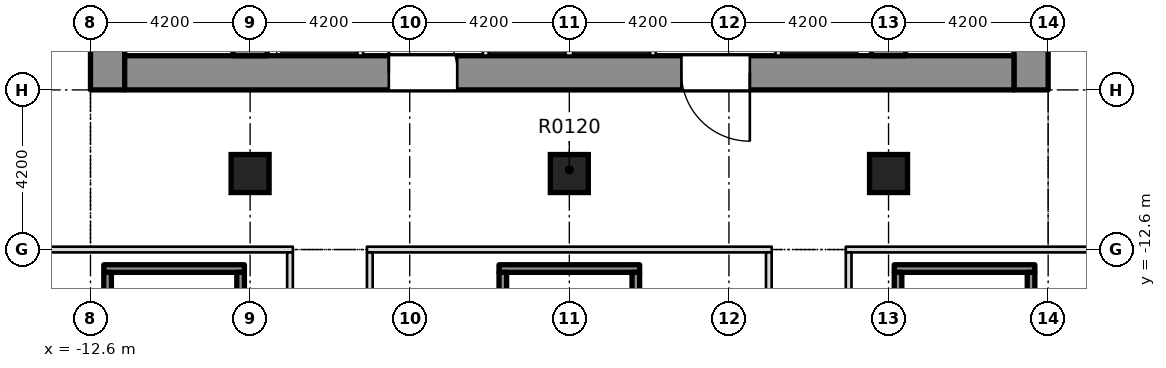
"""IFC4 building model, lengths in metres.
Left out: names, types, materials, properties, quantities, classifications, styles, units other than length and angle.
Written with IfcOpenShell. Run it as: python <this file> out.ifc"""

import sys

from ifc_helpers import new_model, si_unit, direction, frame, frame_2d, origin, origin_2d, place, context, subcontext, project, spatial, rectangle, extrude, element, fill, save


model = new_model("IFC4")
c1 = context("Model", 3, precision=1e-05, world=origin(), true_north=direction((0.0, 1.0)))
c2 = subcontext(c1, "Body", "Model", "MODEL_VIEW")
j1 = project(units=[si_unit("LENGTHUNIT", "METRE"), si_unit("PLANEANGLEUNIT", "RADIAN")], contexts=[c1])
p1 = place(None, origin())
s1 = spatial("IfcSite", under=j1, at=p1, CompositionType="ELEMENT")
p2 = place(p1, origin())
s2 = spatial("IfcBuilding", under=s1, at=p2, CompositionType="ELEMENT")
p3 = place(p2, frame((0.0, 0.0, 7.5)))
s3 = spatial("IfcBuildingStorey", under=s2, at=p3, CompositionType="ELEMENT", Elevation=7.5)
p4 = place(p3, frame((12.15, -8.4, -0.4), z_axis=(0.0, 0.0, 1.0), x_axis=(0.0, 1.0, 0.0)))
e1 = element("IfcWall", 1, at=p4, inside=s3, PredefinedType="SHEAR", context=c2, shape_type="SweptSolid", body=[
    extrude(rectangle(XDim=30.15, YDim=0.9, at=frame_2d((15.075, 0.0))), origin(), (0.0, 0.0, 1.0), 5.0),
])
p5 = place(p4, frame((2.925, 0.0, 0.4)))
e2 = element("IfcOpeningElement", 2, at=p5, cuts=e1, PredefinedType="OPENING", context=c2, shape_type="SweptSolid", body=[
    extrude(rectangle(XDim=0.95, YDim=2.1, at=frame_2d((0.475, 1.05))), frame((0.0, 0.46, 0.0), z_axis=(0.0, -1.0, 0.0), x_axis=(1.0, 0.0, 0.0)), (0.0, 0.0, 1.0), 0.92),
])
p6 = place(p4, frame((7.025, 0.0, 0.4)))
e3 = element("IfcOpeningElement", 3, at=p6, cuts=e1, PredefinedType="OPENING", context=c2, shape_type="SweptSolid", body=[
    extrude(rectangle(XDim=0.95, YDim=2.1, at=frame_2d((0.475, 1.05))), frame((0.0, 0.46, 0.0), z_axis=(0.0, -1.0, 0.0), x_axis=(1.0, 0.0, 0.0)), (0.0, 0.0, 1.0), 0.92),
])
p7 = place(p4, frame((10.875, 0.0, 0.4)))
e4 = element("IfcOpeningElement", 4, at=p7, cuts=e1, PredefinedType="OPENING", context=c2, shape_type="SweptSolid", body=[
    extrude(rectangle(XDim=0.95, YDim=2.1, at=frame_2d((0.475, 1.05))), frame((0.0, 0.46, 0.0), z_axis=(0.0, -1.0, 0.0), x_axis=(1.0, 0.0, 0.0)), (0.0, 0.0, 1.0), 0.92),
])
p8 = place(p4, frame((15.625, 0.0, 0.4)))
e5 = element("IfcOpeningElement", 5, at=p8, cuts=e1, PredefinedType="OPENING", context=c2, shape_type="SweptSolid", body=[
    extrude(rectangle(XDim=0.95, YDim=2.1, at=frame_2d((0.475, 1.05))), frame((0.0, 0.46, 0.0), z_axis=(0.0, -1.0, 0.0), x_axis=(1.0, 0.0, 0.0)), (0.0, 0.0, 1.0), 0.92),
])
p9 = place(p4, frame((24.75, 0.0, 0.4)))
e6 = element("IfcOpeningElement", 6, at=p9, cuts=e1, PredefinedType="OPENING", context=c2, shape_type="SweptSolid", body=[
    extrude(rectangle(XDim=0.95, YDim=2.1, at=frame_2d((0.475, 1.05))), frame((0.0, 0.46, 0.0), z_axis=(0.0, -1.0, 0.0), x_axis=(1.0, 0.0, 0.0)), (0.0, 0.0, 1.0), 0.92),
])
p10 = place(p4, frame((19.3, 0.0, 0.4)))
e7 = element("IfcOpeningElement", 7, at=p10, cuts=e1, PredefinedType="OPENING", context=c2, shape_type="SweptSolid", body=[
    extrude(rectangle(XDim=1.2, YDim=2.1, at=frame_2d((0.6, 1.05))), frame((0.0, 0.46, 0.0), z_axis=(0.0, -1.0, 0.0), x_axis=(1.0, 0.0, 0.0)), (0.0, 0.0, 1.0), 0.92),
])
p11 = place(p3, frame((-12.15, -8.4, -0.4), z_axis=(0.0, 0.0, 1.0), x_axis=(0.0, 1.0, 0.0)))
e8 = element("IfcWall", 8, at=p11, inside=s3, PredefinedType="SHEAR", context=c2, shape_type="SweptSolid", body=[
    extrude(rectangle(XDim=30.15, YDim=0.9, at=frame_2d((15.075, 0.0))), origin(), (0.0, 0.0, 1.0), 5.0),
])
p12 = place(p11, frame((2.875, 0.0, 0.4)))
e9 = element("IfcOpeningElement", 9, at=p12, cuts=e8, PredefinedType="OPENING", context=c2, shape_type="SweptSolid", body=[
    extrude(rectangle(XDim=0.95, YDim=2.1, at=frame_2d((0.475, 1.05))), frame((0.0, 0.46, 0.0), z_axis=(0.0, -1.0, 0.0), x_axis=(1.0, 0.0, 0.0)), (0.0, 0.0, 1.0), 0.92),
])
p13 = place(p11, frame((6.575, 0.0, 0.4)))
e10 = element("IfcOpeningElement", 10, at=p13, cuts=e8, PredefinedType="OPENING", context=c2, shape_type="SweptSolid", body=[
    extrude(rectangle(XDim=0.95, YDim=2.1, at=frame_2d((0.475, 1.05))), frame((0.0, 0.46, 0.0), z_axis=(0.0, -1.0, 0.0), x_axis=(1.0, 0.0, 0.0)), (0.0, 0.0, 1.0), 0.92),
])
p14 = place(p11, frame((9.425, 0.0, 0.4)))
e11 = element("IfcOpeningElement", 11, at=p14, cuts=e8, PredefinedType="OPENING", context=c2, shape_type="SweptSolid", body=[
    extrude(rectangle(XDim=0.95, YDim=2.1, at=frame_2d((0.475, 1.05))), frame((0.0, 0.46, 0.0), z_axis=(0.0, -1.0, 0.0), x_axis=(1.0, 0.0, 0.0)), (0.0, 0.0, 1.0), 0.92),
])
p15 = place(p11, frame((13.225, 0.0, 0.4)))
e12 = element("IfcOpeningElement", 12, at=p15, cuts=e8, PredefinedType="OPENING", context=c2, shape_type="SweptSolid", body=[
    extrude(rectangle(XDim=0.95, YDim=2.1, at=frame_2d((0.475, 1.05))), frame((0.0, 0.46, 0.0), z_axis=(0.0, -1.0, 0.0), x_axis=(1.0, 0.0, 0.0)), (0.0, 0.0, 1.0), 0.92),
])
p16 = place(p11, frame((16.775, 0.0, 0.4)))
e13 = element("IfcOpeningElement", 13, at=p16, cuts=e8, PredefinedType="OPENING", context=c2, shape_type="SweptSolid", body=[
    extrude(rectangle(XDim=0.95, YDim=2.1, at=frame_2d((0.475, 1.05))), frame((0.0, 0.46, 0.0), z_axis=(0.0, -1.0, 0.0), x_axis=(1.0, 0.0, 0.0)), (0.0, 0.0, 1.0), 0.92),
])
p17 = place(p11, frame((24.75, 0.0, 0.4)))
e14 = element("IfcOpeningElement", 14, at=p17, cuts=e8, PredefinedType="OPENING", context=c2, shape_type="SweptSolid", body=[
    extrude(rectangle(XDim=0.95, YDim=2.1, at=frame_2d((0.475, 1.05))), frame((0.0, 0.46, 0.0), z_axis=(0.0, -1.0, 0.0), x_axis=(1.0, 0.0, 0.0)), (0.0, 0.0, 1.0), 0.92),
])
p18 = place(p11, frame((19.3, 0.0, 0.4)))
e15 = element("IfcOpeningElement", 15, at=p18, cuts=e8, PredefinedType="OPENING", context=c2, shape_type="SweptSolid", body=[
    extrude(rectangle(XDim=1.2, YDim=2.1, at=frame_2d((0.6, 1.05))), frame((0.0, 0.46, 0.0), z_axis=(0.0, -1.0, 0.0), x_axis=(1.0, 0.0, 0.0)), (0.0, 0.0, 1.0), 0.92),
])
p19 = place(p3, frame((-11.7, -7.95, -0.4), z_axis=(0.0, 0.0, 1.0), x_axis=(1.0, 0.0, 0.0)))
e16 = element("IfcWall", 16, at=p19, inside=s3, PredefinedType="SHEAR", context=c2, shape_type="SweptSolid", body=[
    extrude(rectangle(XDim=23.4, YDim=0.9, at=frame_2d((11.7, 0.0))), origin(), (0.0, 0.0, 1.0), 5.0),
])
p20 = place(p19, frame((6.95, 0.0, 0.4)))
e17 = element("IfcOpeningElement", 17, at=p20, cuts=e16, PredefinedType="OPENING", context=c2, shape_type="SweptSolid", body=[
    extrude(rectangle(XDim=1.8, YDim=2.1, at=frame_2d((0.9, 1.05))), frame((0.0, 0.46, 0.0), z_axis=(0.0, -1.0, 0.0), x_axis=(1.0, 0.0, 0.0)), (0.0, 0.0, 1.0), 0.92),
])
p21 = place(p19, frame((14.65, 0.0, 0.4)))
e18 = element("IfcOpeningElement", 18, at=p21, cuts=e16, PredefinedType="OPENING", context=c2, shape_type="SweptSolid", body=[
    extrude(rectangle(XDim=1.8, YDim=2.1, at=frame_2d((0.9, 1.05))), frame((0.0, 0.46, 0.0), z_axis=(0.0, -1.0, 0.0), x_axis=(1.0, 0.0, 0.0)), (0.0, 0.0, 1.0), 0.92),
])
p22 = place(p3, frame((-8.4, -7.5, -0.4), z_axis=(0.0, 0.0, 1.0), x_axis=(0.0, 1.0, 0.0)))
e19 = element("IfcWall", 19, at=p22, inside=s3, PredefinedType="SHEAR", context=c2, shape_type="SweptSolid", body=[
    extrude(rectangle(XDim=28.35, YDim=0.9, at=frame_2d((14.175, 0.0))), origin(), (0.0, 0.0, 1.0), 5.0),
])
p23 = place(p22, frame((18.4, 0.0, 0.4)))
e20 = element("IfcOpeningElement", 20, at=p23, cuts=e19, PredefinedType="OPENING", context=c2, shape_type="SweptSolid", body=[
    extrude(rectangle(XDim=1.2, YDim=2.1, at=frame_2d((0.6, 1.05))), frame((0.0, 0.46, 0.0), z_axis=(0.0, -1.0, 0.0), x_axis=(1.0, 0.0, 0.0)), (0.0, 0.0, 1.0), 0.92),
])
p24 = place(p3, frame((8.4, -7.5, -0.4), z_axis=(0.0, 0.0, 1.0), x_axis=(0.0, 1.0, 0.0)))
e21 = element("IfcWall", 21, at=p24, inside=s3, PredefinedType="SHEAR", context=c2, shape_type="SweptSolid", body=[
    extrude(rectangle(XDim=28.35, YDim=0.9, at=frame_2d((14.175, 0.0))), origin(), (0.0, 0.0, 1.0), 5.0),
])
p25 = place(p24, frame((18.4, 0.0, 0.4)))
e22 = element("IfcOpeningElement", 22, at=p25, cuts=e21, PredefinedType="OPENING", context=c2, shape_type="SweptSolid", body=[
    extrude(rectangle(XDim=1.2, YDim=2.1, at=frame_2d((0.6, 1.05))), frame((0.0, 0.46, 0.0), z_axis=(0.0, -1.0, 0.0), x_axis=(1.0, 0.0, 0.0)), (0.0, 0.0, 1.0), 0.92),
])
for number, where, z_axis, x_axis in (
    (23, (-8.4, -10.6, -0.4), (0.0, 0.0, 1.0), (1.0, 0.0, 0.0)),
    (24, (0.0, -10.6, -0.4), (0.0, 0.0, 1.0), (1.0, 0.0, 0.0)),
    (25, (8.4, -10.6, -0.4), (0.0, 0.0, 1.0), (1.0, 0.0, 0.0)),
):
    element("IfcColumn", number, at=place(p3, frame(where, z_axis=z_axis, x_axis=x_axis)), inside=s3, PredefinedType="COLUMN", context=c2, shape_type="SweptSolid", body=[
        extrude(rectangle(XDim=1.0, YDim=1.0, at=origin_2d()), origin(), (0.0, 0.0, 1.0), 5.0),
    ])
p26 = place(p3, frame((-16.9, -12.6, 0.0), z_axis=(0.0, 0.0, 1.0), x_axis=(1.0, 0.0, 0.0)))
e26 = element("IfcWall", 26, at=p26, inside=s3, PredefinedType="PARTITIONING", context=c2, shape_type="SweptSolid", body=[
    extrude(rectangle(XDim=9.625, YDim=0.15, at=frame_2d((4.812, 0.0))), origin(), (0.0, 0.0, 1.0), 4.6),
])
p27 = place(p3, frame((-5.325, -12.6, 0.0), z_axis=(0.0, 0.0, 1.0), x_axis=(1.0, 0.0, 0.0)))
e27 = element("IfcWall", 27, at=p27, inside=s3, PredefinedType="PARTITIONING", context=c2, shape_type="SweptSolid", body=[
    extrude(rectangle(XDim=10.65, YDim=0.15, at=frame_2d((5.325, 0.0))), origin(), (0.0, 0.0, 1.0), 4.6),
])
p28 = place(p3, frame((7.275, -12.6, 0.0), z_axis=(0.0, 0.0, 1.0), x_axis=(1.0, 0.0, 0.0)))
e28 = element("IfcWall", 28, at=p28, inside=s3, PredefinedType="PARTITIONING", context=c2, shape_type="SweptSolid", body=[
    extrude(rectangle(XDim=9.625, YDim=0.15, at=frame_2d((4.812, 0.0))), origin(), (0.0, 0.0, 1.0), 4.6),
])
for number, where, z_axis, x_axis in (
    (29, (-7.35, -18.125, 0.0), (0.0, 0.0, 1.0), (0.0, 1.0, 0.0)),
    (30, (-5.25, -18.125, 0.0), (0.0, 0.0, 1.0), (0.0, 1.0, 0.0)),
    (31, (5.25, -18.125, 0.0), (0.0, 0.0, 1.0), (0.0, 1.0, 0.0)),
    (32, (7.35, -18.125, 0.0), (0.0, 0.0, 1.0), (0.0, 1.0, 0.0)),
):
    element("IfcWall", number, at=place(p3, frame(where, z_axis=z_axis, x_axis=x_axis)), inside=s3, PredefinedType="PARTITIONING", context=c2, shape_type="SweptSolid", body=[
        extrude(rectangle(XDim=5.45, YDim=0.15, at=frame_2d((2.725, 0.0))), origin(), (0.0, 0.0, 1.0), 4.6),
    ])
p29 = place(p3, frame((-5.5, -7.499, 0.0), z_axis=(0.0, 0.0, 1.0), x_axis=(0.0, 1.0, 0.0)))
e33 = element("IfcWall", 33, at=p29, inside=s3, PredefinedType="PARTITIONING", context=c2, shape_type="SweptSolid", body=[
    extrude(rectangle(XDim=11.924, YDim=0.15, at=frame_2d((5.962, 0.0))), origin(), (0.0, 0.0, 1.0), 4.6),
])
p30 = place(p29, frame((0.949, 0.0, 0.0)))
e34 = element("IfcOpeningElement", 34, at=p30, cuts=e33, PredefinedType="OPENING", context=c2, shape_type="SweptSolid", body=[
    extrude(rectangle(XDim=1.1, YDim=2.1, at=frame_2d((0.55, 1.05))), frame((0.0, 0.085, 0.0), z_axis=(0.0, -1.0, 0.0), x_axis=(1.0, 0.0, 0.0)), (0.0, 0.0, 1.0), 0.17),
])
p31 = place(p29, frame((3.949, 0.0, 0.0)))
e35 = element("IfcOpeningElement", 35, at=p31, cuts=e33, PredefinedType="OPENING", context=c2, shape_type="SweptSolid", body=[
    extrude(rectangle(XDim=1.1, YDim=2.1, at=frame_2d((0.55, 1.05))), frame((0.0, 0.085, 0.0), z_axis=(0.0, -1.0, 0.0), x_axis=(1.0, 0.0, 0.0)), (0.0, 0.0, 1.0), 0.17),
])
p32 = place(p29, frame((6.949, 0.0, 0.0)))
e36 = element("IfcOpeningElement", 36, at=p32, cuts=e33, PredefinedType="OPENING", context=c2, shape_type="SweptSolid", body=[
    extrude(rectangle(XDim=1.1, YDim=2.1, at=frame_2d((0.55, 1.05))), frame((0.0, 0.085, 0.0), z_axis=(0.0, -1.0, 0.0), x_axis=(1.0, 0.0, 0.0)), (0.0, 0.0, 1.0), 0.17),
])
p33 = place(p29, frame((9.949, 0.0, 0.0)))
e37 = element("IfcOpeningElement", 37, at=p33, cuts=e33, PredefinedType="OPENING", context=c2, shape_type="SweptSolid", body=[
    extrude(rectangle(XDim=1.1, YDim=2.1, at=frame_2d((0.55, 1.05))), frame((0.0, 0.085, 0.0), z_axis=(0.0, -1.0, 0.0), x_axis=(1.0, 0.0, 0.0)), (0.0, 0.0, 1.0), 0.17),
])
p34 = place(p3, frame((-2.2, -7.499, 0.0), z_axis=(0.0, 0.0, 1.0), x_axis=(0.0, 1.0, 0.0)))
e38 = element("IfcWall", 38, at=p34, inside=s3, PredefinedType="PARTITIONING", context=c2, shape_type="SweptSolid", body=[
    extrude(rectangle(XDim=11.924, YDim=0.15, at=frame_2d((5.962, 0.0))), origin(), (0.0, 0.0, 1.0), 4.6),
])
p35 = place(p34, frame((0.949, 0.0, 0.0)))
e39 = element("IfcOpeningElement", 39, at=p35, cuts=e38, PredefinedType="OPENING", context=c2, shape_type="SweptSolid", body=[
    extrude(rectangle(XDim=1.1, YDim=2.1, at=frame_2d((0.55, 1.05))), frame((0.0, 0.085, 0.0), z_axis=(0.0, -1.0, 0.0), x_axis=(1.0, 0.0, 0.0)), (0.0, 0.0, 1.0), 0.17),
])
p36 = place(p34, frame((3.949, 0.0, 0.0)))
e40 = element("IfcOpeningElement", 40, at=p36, cuts=e38, PredefinedType="OPENING", context=c2, shape_type="SweptSolid", body=[
    extrude(rectangle(XDim=1.1, YDim=2.1, at=frame_2d((0.55, 1.05))), frame((0.0, 0.085, 0.0), z_axis=(0.0, -1.0, 0.0), x_axis=(1.0, 0.0, 0.0)), (0.0, 0.0, 1.0), 0.17),
])
p37 = place(p34, frame((6.949, 0.0, 0.0)))
e41 = element("IfcOpeningElement", 41, at=p37, cuts=e38, PredefinedType="OPENING", context=c2, shape_type="SweptSolid", body=[
    extrude(rectangle(XDim=1.1, YDim=2.1, at=frame_2d((0.55, 1.05))), frame((0.0, 0.085, 0.0), z_axis=(0.0, -1.0, 0.0), x_axis=(1.0, 0.0, 0.0)), (0.0, 0.0, 1.0), 0.17),
])
p38 = place(p34, frame((9.949, 0.0, 0.0)))
e42 = element("IfcOpeningElement", 42, at=p38, cuts=e38, PredefinedType="OPENING", context=c2, shape_type="SweptSolid", body=[
    extrude(rectangle(XDim=1.1, YDim=2.1, at=frame_2d((0.55, 1.05))), frame((0.0, 0.085, 0.0), z_axis=(0.0, -1.0, 0.0), x_axis=(1.0, 0.0, 0.0)), (0.0, 0.0, 1.0), 0.17),
])
p39 = place(p3, frame((0.0, -7.499, 0.0), z_axis=(0.0, 0.0, 1.0), x_axis=(0.0, 1.0, 0.0)))
e43 = element("IfcWall", 43, at=p39, inside=s3, PredefinedType="PARTITIONING", context=c2, shape_type="SweptSolid", body=[
    extrude(rectangle(XDim=11.924, YDim=0.2, at=frame_2d((5.962, 0.0))), origin(), (0.0, 0.0, 1.0), 4.6),
])
p40 = place(p3, frame((2.2, -7.499, 0.0), z_axis=(0.0, 0.0, 1.0), x_axis=(0.0, 1.0, 0.0)))
e44 = element("IfcWall", 44, at=p40, inside=s3, PredefinedType="PARTITIONING", context=c2, shape_type="SweptSolid", body=[
    extrude(rectangle(XDim=11.924, YDim=0.15, at=frame_2d((5.962, 0.0))), origin(), (0.0, 0.0, 1.0), 4.6),
])
p41 = place(p3, frame((5.5, -7.499, 0.0), z_axis=(0.0, 0.0, 1.0), x_axis=(0.0, 1.0, 0.0)))
e45 = element("IfcWall", 45, at=p41, inside=s3, PredefinedType="PARTITIONING", context=c2, shape_type="SweptSolid", body=[
    extrude(rectangle(XDim=11.924, YDim=0.15, at=frame_2d((5.962, 0.0))), origin(), (0.0, 0.0, 1.0), 4.6),
])
p42 = place(p41, frame((6.949, 0.0, 0.0)))
e46 = element("IfcOpeningElement", 46, at=p42, cuts=e45, PredefinedType="OPENING", context=c2, shape_type="SweptSolid", body=[
    extrude(rectangle(XDim=1.1, YDim=2.1, at=frame_2d((0.55, 1.05))), frame((0.0, 0.085, 0.0), z_axis=(0.0, -1.0, 0.0), x_axis=(1.0, 0.0, 0.0)), (0.0, 0.0, 1.0), 0.17),
])
p43 = place(p41, frame((9.949, 0.0, 0.0)))
e47 = element("IfcOpeningElement", 47, at=p43, cuts=e45, PredefinedType="OPENING", context=c2, shape_type="SweptSolid", body=[
    extrude(rectangle(XDim=1.1, YDim=2.1, at=frame_2d((0.55, 1.05))), frame((0.0, 0.085, 0.0), z_axis=(0.0, -1.0, 0.0), x_axis=(1.0, 0.0, 0.0)), (0.0, 0.0, 1.0), 0.17),
])
p44 = place(p3, frame((-12.25, -13.1, 0.0), z_axis=(0.0, 0.0, 1.0), x_axis=(1.0, 0.0, 0.0)))
e48 = element("IfcWall", 48, at=p44, inside=s3, PredefinedType="SOLIDWALL", context=c2, shape_type="SweptSolid", body=[
    extrude(rectangle(XDim=3.7, YDim=0.2, at=frame_2d((1.85, 0.0))), origin(), (0.0, 0.0, 1.0), 4.6),
])
p45 = place(p3, frame((-12.15, -19.8, 0.0), z_axis=(0.0, 0.0, 1.0), x_axis=(0.0, 1.0, 0.0)))
e49 = element("IfcWall", 49, at=p45, inside=s3, PredefinedType="SOLIDWALL", context=c2, shape_type="SweptSolid", body=[
    extrude(rectangle(XDim=6.6, YDim=0.2, at=frame_2d((3.3, 0.0))), origin(), (0.0, 0.0, 1.0), 4.6),
])
p46 = place(p3, frame((-8.65, -20.3, 0.0), z_axis=(0.0, 0.0, 1.0), x_axis=(0.0, 1.0, 0.0)))
e50 = element("IfcWall", 50, at=p46, inside=s3, PredefinedType="SOLIDWALL", context=c2, shape_type="SweptSolid", body=[
    extrude(rectangle(XDim=7.1, YDim=0.2, at=frame_2d((3.55, 0.0))), origin(), (0.0, 0.0, 1.0), 4.6),
])
p47 = place(p3, frame((-1.85, -13.1, 0.0), z_axis=(0.0, 0.0, 1.0), x_axis=(1.0, 0.0, 0.0)))
e51 = element("IfcWall", 51, at=p47, inside=s3, PredefinedType="SOLIDWALL", context=c2, shape_type="SweptSolid", body=[
    extrude(rectangle(XDim=3.7, YDim=0.2, at=frame_2d((1.85, 0.0))), origin(), (0.0, 0.0, 1.0), 4.6),
])
for number, where, z_axis, x_axis in (
    (52, (-1.75, -19.8, 0.0), (0.0, 0.0, 1.0), (0.0, 1.0, 0.0)),
    (53, (1.75, -19.8, 0.0), (0.0, 0.0, 1.0), (0.0, 1.0, 0.0)),
):
    element("IfcWall", number, at=place(p3, frame(where, z_axis=z_axis, x_axis=x_axis)), inside=s3, PredefinedType="SOLIDWALL", context=c2, shape_type="SweptSolid", body=[
        extrude(rectangle(XDim=6.6, YDim=0.2, at=frame_2d((3.3, 0.0))), origin(), (0.0, 0.0, 1.0), 4.6),
    ])
p48 = place(p3, frame((8.55, -13.1, 0.0), z_axis=(0.0, 0.0, 1.0), x_axis=(1.0, 0.0, 0.0)))
e54 = element("IfcWall", 54, at=p48, inside=s3, PredefinedType="SOLIDWALL", context=c2, shape_type="SweptSolid", body=[
    extrude(rectangle(XDim=3.7, YDim=0.2, at=frame_2d((1.85, 0.0))), origin(), (0.0, 0.0, 1.0), 4.6),
])
p49 = place(p3, frame((8.65, -20.3, 0.0), z_axis=(0.0, 0.0, 1.0), x_axis=(0.0, 1.0, 0.0)))
e55 = element("IfcWall", 55, at=p49, inside=s3, PredefinedType="SOLIDWALL", context=c2, shape_type="SweptSolid", body=[
    extrude(rectangle(XDim=7.1, YDim=0.2, at=frame_2d((3.55, 0.0))), origin(), (0.0, 0.0, 1.0), 4.6),
])
p50 = place(p3, frame((12.15, -19.8, 0.0), z_axis=(0.0, 0.0, 1.0), x_axis=(0.0, 1.0, 0.0)))
e56 = element("IfcWall", 56, at=p50, inside=s3, PredefinedType="SOLIDWALL", context=c2, shape_type="SweptSolid", body=[
    extrude(rectangle(XDim=6.6, YDim=0.2, at=frame_2d((3.3, 0.0))), origin(), (0.0, 0.0, 1.0), 4.6),
])
p51 = place(p20, origin())
e57 = element("IfcDoor", 57, at=p51, inside=s3, OperationType="SINGLE_SWING_LEFT", PredefinedType="DOOR", context=c2, shape_type="SweptSolid", body=[
    extrude(rectangle(XDim=1.8, YDim=2.1, at=frame_2d((0.9, 1.05))), frame((0.0, 0.025, 0.0), z_axis=(0.0, -1.0, 0.0), x_axis=(1.0, 0.0, 0.0)), (0.0, 0.0, 1.0), 0.05),
])
fill(e17, e57)
p52 = place(p21, origin())
e58 = element("IfcDoor", 58, at=p52, inside=s3, OperationType="SINGLE_SWING_LEFT", PredefinedType="DOOR", context=c2, shape_type="SweptSolid", body=[
    extrude(rectangle(XDim=1.8, YDim=2.1, at=frame_2d((0.9, 1.05))), frame((0.0, 0.025, 0.0), z_axis=(0.0, -1.0, 0.0), x_axis=(1.0, 0.0, 0.0)), (0.0, 0.0, 1.0), 0.05),
])
fill(e18, e58)
save(model, sys.argv[1])
